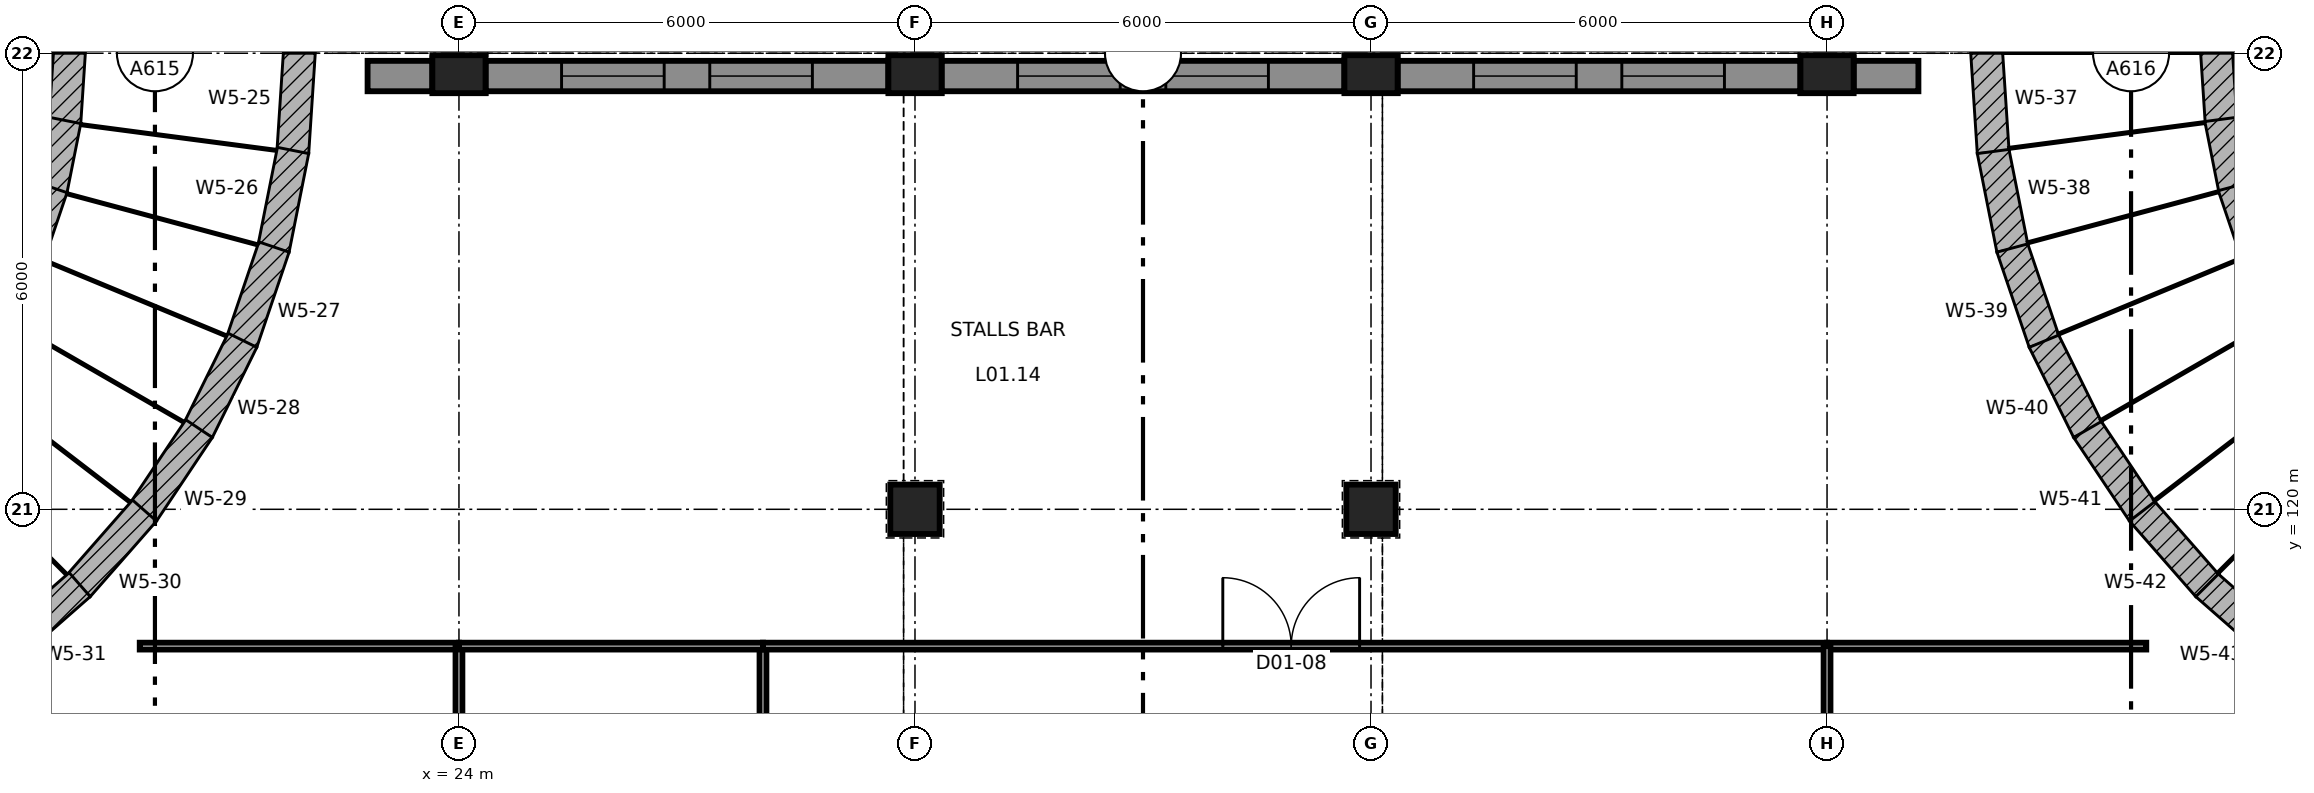
"""IFC4 building model, lengths in metres.
Left out: names, types, materials, properties, quantities, classifications, styles, units other than length and angle.
Written with IfcOpenShell. Run it as: python <this file> out.ifc"""

import sys

from ifc_helpers import new_model, si_unit, direction, frame, frame_2d, origin, origin_2d, place, context, subcontext, project, spatial, polyline, rectangle, outline, extrude, element, fill, save


model = new_model("IFC4")
c1 = context("Model", 3, precision=1e-05, world=origin(), true_north=direction((0.0, 1.0)))
c2 = subcontext(c1, "Body", "Model", "MODEL_VIEW")
j1 = project(units=[si_unit("LENGTHUNIT", "METRE"), si_unit("PLANEANGLEUNIT", "RADIAN")], contexts=[c1])
p1 = place(None, origin())
s1 = spatial("IfcSite", under=j1, at=p1, CompositionType="ELEMENT")
p2 = place(p1, origin())
s2 = spatial("IfcBuilding", under=s1, at=p2, CompositionType="ELEMENT")
p3 = place(p2, frame((0.0, 0.0, 7.0)))
s3 = spatial("IfcBuildingStorey", under=s2, at=p3, CompositionType="ELEMENT", Elevation=7.0)
for number, where, z_axis, x_axis in (
    (1, (30.0, 120.0, 0.0), (0.0, 0.0, 1.0), (1.0, 0.0, 0.0)),
    (2, (36.0, 120.0, 0.0), (0.0, 0.0, 1.0), (1.0, 0.0, 0.0)),
):
    element("IfcColumn", number, at=place(p3, frame(where, z_axis=z_axis, x_axis=x_axis)), inside=s3, PredefinedType="COLUMN", context=c2, shape_type="SweptSolid", body=[
        extrude(rectangle(XDim=0.65, YDim=0.65, at=origin_2d()), origin(), (0.0, 0.0, 1.0), 5.0),
    ])
for number, where, z_axis, x_axis in (
    (3, (24.0, 125.725, 0.0), (0.0, 0.0, 1.0), (1.0, 0.0, 0.0)),
    (4, (30.0, 125.725, 0.0), (0.0, 0.0, 1.0), (1.0, 0.0, 0.0)),
    (5, (36.0, 125.725, 0.0), (0.0, 0.0, 1.0), (1.0, 0.0, 0.0)),
    (6, (42.0, 125.725, 0.0), (0.0, 0.0, 1.0), (1.0, 0.0, 0.0)),
):
    element("IfcColumn", number, at=place(p3, frame(where, z_axis=z_axis, x_axis=x_axis)), inside=s3, PredefinedType="COLUMN", context=c2, shape_type="SweptSolid", body=[
        extrude(rectangle(XDim=0.7, YDim=0.5, at=origin_2d()), origin(), (0.0, 0.0, 1.0), 5.0),
    ])
p4 = place(p3, frame((22.11, 126.0, 0.0), z_axis=(0.836965590728, -0.054899407289, 0.544494862249), x_axis=(-0.065478224383, -0.997853997628, 3.9353391e-05)))
e7 = element("IfcWall", 7, at=p4, inside=s3, PredefinedType="SOLIDWALL", context=c2, shape_type="SweptSolid", body=[
    extrude(outline(polyline([(0.0, 0.0), (1.322, 0.0), (1.125, -5.544), (0.198, -5.544), (0.0, 0.0)])), origin(), (-7.539e-05, 0.544, 0.839), 0.596),
])
p5 = place(p3, frame((22.023, 124.68, 0.0), z_axis=(0.822637628243, -0.163726196101, 0.544482382919), x_axis=(-0.19518555592, -0.980766332218, -1.8656341e-05)))
e8 = element("IfcWall", 8, at=p5, inside=s3, PredefinedType="SOLIDWALL", context=c2, shape_type="SweptSolid", body=[
    extrude(outline(polyline([(0.0, 0.0), (1.322, 0.0), (1.125, -5.544), (0.198, -5.544), (0.0, 0.0)])), origin(), (-9.736e-05, 0.544, 0.839), 0.596),
])
p6 = place(p3, frame((21.765, 123.383, 0.0), z_axis=(0.794324736016, -0.269418488523, 0.544483141883), x_axis=(-0.321223106822, -0.947003545328, 2.7908524e-05)))
e9 = element("IfcWall", 9, at=p6, inside=s3, PredefinedType="SOLIDWALL", context=c2, shape_type="SweptSolid", body=[
    extrude(outline(polyline([(0.0, 0.0), (1.322, -5.551e-17), (1.124, -5.544), (0.197, -5.544), (0.0, 0.0)])), origin(), (0.0, 0.544, 0.839), 0.596),
])
p7 = place(p3, frame((21.34, 122.131, 0.0), z_axis=(0.752251892463, -0.371027167972, 0.544477667964), x_axis=(-0.442340729705, -0.896847076605, -5.472957e-06)))
e10 = element("IfcWall", 10, at=p7, inside=s3, PredefinedType="SOLIDWALL", context=c2, shape_type="SweptSolid", body=[
    extrude(outline(polyline([(0.0, 0.0), (1.322, 0.0), (1.125, -5.544), (0.198, -5.544), (0.0, 0.0)])), origin(), (-5.786e-05, 0.544, 0.839), 0.596),
])
p8 = place(p3, frame((20.755, 120.945, 0.0), z_axis=(0.697421440223, -0.465979494917, 0.544487323116), x_axis=(-0.555539086285, -0.831490422718, -2.3173265e-05)))
e11 = element("IfcWall", 11, at=p8, inside=s3, PredefinedType="SOLIDWALL", context=c2, shape_type="SweptSolid", body=[
    extrude(outline(polyline([(0.0, 0.0), (1.322, 0.0), (1.124, -5.544), (0.198, -5.544), (0.0, 0.0)])), origin(), (3.705e-05, 0.544, 0.839), 0.596),
])
p9 = place(p3, frame((20.021, 119.845, 0.0), z_axis=(0.630572172367, -0.553093552863, 0.544487150645), x_axis=(-0.659421060078, -0.751773812455, 2.0792921e-05)))
e12 = element("IfcWall", 12, at=p9, inside=s3, PredefinedType="SOLIDWALL", context=c2, shape_type="SweptSolid", body=[
    extrude(outline(polyline([(0.0, 0.0), (1.322, -5.551e-17), (1.125, -5.544), (0.198, -5.544), (0.0, 0.0)])), origin(), (-0.0, 0.544, 0.839), 0.596),
])
p10 = place(p3, frame((19.148, 118.851, 0.0), z_axis=(0.553093552863, -0.630572172367, 0.544487150645), x_axis=(-0.751773812455, -0.659421060078, -2.0792921e-05)))
e13 = element("IfcWall", 13, at=p10, inside=s3, PredefinedType="SOLIDWALL", context=c2, shape_type="SweptSolid", body=[
    extrude(outline(polyline([(0.0, 0.0), (1.322, 5.551e-17), (1.124, -5.544), (0.197, -5.544), (0.0, 0.0)])), origin(), (0.0, 0.544, 0.839), 0.596),
])
p11 = place(p3, frame((43.977, 124.68, 0.0), z_axis=(-0.836965590728, -0.054899407289, 0.544494862249), x_axis=(-0.065478224383, 0.997853997628, -3.9353391e-05)))
e14 = element("IfcWall", 14, at=p11, inside=s3, PredefinedType="SOLIDWALL", context=c2, shape_type="SweptSolid", body=[
    extrude(outline(polyline([(0.0, 0.0), (1.322, 0.0), (1.124, -5.544), (0.197, -5.544), (0.0, 0.0)])), origin(), (7.539e-05, 0.544, 0.839), 0.596),
])
p12 = place(p3, frame((44.235, 123.383, 0.0), z_axis=(-0.822637628243, -0.163726196101, 0.544482382919), x_axis=(-0.19518555592, 0.980766332218, 1.8656341e-05)))
e15 = element("IfcWall", 15, at=p12, inside=s3, PredefinedType="SOLIDWALL", context=c2, shape_type="SweptSolid", body=[
    extrude(outline(polyline([(0.0, 0.0), (1.322, 0.0), (1.124, -5.544), (0.198, -5.544), (0.0, 0.0)])), origin(), (9.736e-05, 0.544, 0.839), 0.596),
])
p13 = place(p3, frame((44.66, 122.131, 0.0), z_axis=(-0.794324736016, -0.269418488523, 0.544483141883), x_axis=(-0.321223106822, 0.947003545328, -2.7908524e-05)))
e16 = element("IfcWall", 16, at=p13, inside=s3, PredefinedType="SOLIDWALL", context=c2, shape_type="SweptSolid", body=[
    extrude(outline(polyline([(0.0, 0.0), (1.322, 5.551e-17), (1.125, -5.544), (0.198, -5.544), (0.0, 0.0)])), origin(), (-0.0, 0.544, 0.839), 0.596),
])
p14 = place(p3, frame((45.245, 120.945, 0.0), z_axis=(-0.752251892463, -0.371027167972, 0.544477667964), x_axis=(-0.442340729705, 0.896847076605, 5.472957e-06)))
e17 = element("IfcWall", 17, at=p14, inside=s3, PredefinedType="SOLIDWALL", context=c2, shape_type="SweptSolid", body=[
    extrude(outline(polyline([(0.0, 0.0), (1.322, 0.0), (1.124, -5.544), (0.198, -5.544), (0.0, 0.0)])), origin(), (5.786e-05, 0.544, 0.839), 0.596),
])
p15 = place(p3, frame((45.979, 119.845, 0.0), z_axis=(-0.697421440223, -0.465979494917, 0.544487323116), x_axis=(-0.555539086285, 0.831490422718, 2.3173265e-05)))
e18 = element("IfcWall", 18, at=p15, inside=s3, PredefinedType="SOLIDWALL", context=c2, shape_type="SweptSolid", body=[
    extrude(outline(polyline([(0.0, 0.0), (1.322, 0.0), (1.125, -5.544), (0.198, -5.544), (0.0, 0.0)])), origin(), (-3.705e-05, 0.544, 0.839), 0.596),
])
p16 = place(p3, frame((46.852, 118.851, 0.0), z_axis=(-0.630572172367, -0.553093552863, 0.544487150645), x_axis=(-0.659421060078, 0.751773812455, -2.0792921e-05)))
e19 = element("IfcWall", 19, at=p16, inside=s3, PredefinedType="SOLIDWALL", context=c2, shape_type="SweptSolid", body=[
    extrude(outline(polyline([(0.0, 0.0), (1.322, 5.551e-17), (1.124, -5.544), (0.197, -5.544), (0.0, 0.0)])), origin(), (0.0, 0.544, 0.839), 0.596),
])
p17 = place(p3, frame((47.846, 117.979, 0.0), z_axis=(-0.553093552863, -0.630572172367, 0.544487150645), x_axis=(-0.751773812455, 0.659421060078, 2.0792921e-05)))
e20 = element("IfcWall", 20, at=p17, inside=s3, PredefinedType="SOLIDWALL", context=c2, shape_type="SweptSolid", body=[
    extrude(outline(polyline([(0.0, 0.0), (1.322, -5.551e-17), (1.125, -5.544), (0.198, -5.544), (0.0, 0.0)])), origin(), (-0.0, 0.544, 0.839), 0.596),
])
p18 = place(p3, frame((22.798, 125.7, 0.0), z_axis=(0.0, 0.0, 1.0), x_axis=(1.0, 0.0, 0.0)))
e21 = element("IfcWall", 21, at=p18, inside=s3, PredefinedType="SOLIDWALL", context=c2, shape_type="SweptSolid", body=[
    extrude(rectangle(XDim=0.852, YDim=0.4, at=frame_2d((0.426, 0.0))), origin(), (0.0, 0.0, 1.0), 4.65),
])
p19 = place(p3, frame((24.35, 125.7, 0.0), z_axis=(0.0, 0.0, 1.0), x_axis=(1.0, 0.0, 0.0)))
e22 = element("IfcWall", 22, at=p19, inside=s3, PredefinedType="SOLIDWALL", context=c2, shape_type="SweptSolid", body=[
    extrude(rectangle(XDim=5.3, YDim=0.4, at=frame_2d((2.65, 0.0))), origin(), (0.0, 0.0, 1.0), 4.65),
])
p20 = place(p19, frame((1.0, 0.0, 0.9)))
e23 = element("IfcOpeningElement", 23, at=p20, cuts=e22, PredefinedType="OPENING", context=c2, shape_type="SweptSolid", body=[
    extrude(rectangle(XDim=1.35, YDim=2.95, at=frame_2d((0.675, 1.475))), frame((0.0, 0.21, 0.0), z_axis=(0.0, -1.0, 0.0), x_axis=(1.0, 0.0, 0.0)), (0.0, 0.0, 1.0), 0.42),
])
p21 = place(p19, frame((2.95, 0.0, 0.9)))
e24 = element("IfcOpeningElement", 24, at=p21, cuts=e22, PredefinedType="OPENING", context=c2, shape_type="SweptSolid", body=[
    extrude(rectangle(XDim=1.35, YDim=2.95, at=frame_2d((0.675, 1.475))), frame((0.0, 0.21, 0.0), z_axis=(0.0, -1.0, 0.0), x_axis=(1.0, 0.0, 0.0)), (0.0, 0.0, 1.0), 0.42),
])
p22 = place(p3, frame((30.35, 125.7, 0.0), z_axis=(0.0, 0.0, 1.0), x_axis=(1.0, 0.0, 0.0)))
e25 = element("IfcWall", 25, at=p22, inside=s3, PredefinedType="SOLIDWALL", context=c2, shape_type="SweptSolid", body=[
    extrude(rectangle(XDim=5.3, YDim=0.4, at=frame_2d((2.65, 0.0))), origin(), (0.0, 0.0, 1.0), 4.75),
])
p23 = place(p22, frame((1.0, 0.0, 0.9)))
e26 = element("IfcOpeningElement", 26, at=p23, cuts=e25, PredefinedType="OPENING", context=c2, shape_type="SweptSolid", body=[
    extrude(rectangle(XDim=1.35, YDim=2.95, at=frame_2d((0.675, 1.475))), frame((0.0, 0.21, 0.0), z_axis=(0.0, -1.0, 0.0), x_axis=(1.0, 0.0, 0.0)), (0.0, 0.0, 1.0), 0.42),
])
p24 = place(p22, frame((2.95, 0.0, 0.9)))
e27 = element("IfcOpeningElement", 27, at=p24, cuts=e25, PredefinedType="OPENING", context=c2, shape_type="SweptSolid", body=[
    extrude(rectangle(XDim=1.35, YDim=2.95, at=frame_2d((0.675, 1.475))), frame((0.0, 0.21, 0.0), z_axis=(0.0, -1.0, 0.0), x_axis=(1.0, 0.0, 0.0)), (0.0, 0.0, 1.0), 0.42),
])
p25 = place(p3, frame((36.35, 125.7, 0.0), z_axis=(0.0, 0.0, 1.0), x_axis=(1.0, 0.0, 0.0)))
e28 = element("IfcWall", 28, at=p25, inside=s3, PredefinedType="SOLIDWALL", context=c2, shape_type="SweptSolid", body=[
    extrude(rectangle(XDim=5.3, YDim=0.4, at=frame_2d((2.65, 0.0))), origin(), (0.0, 0.0, 1.0), 4.65),
])
p26 = place(p25, frame((1.0, 0.0, 0.9)))
e29 = element("IfcOpeningElement", 29, at=p26, cuts=e28, PredefinedType="OPENING", context=c2, shape_type="SweptSolid", body=[
    extrude(rectangle(XDim=1.35, YDim=2.95, at=frame_2d((0.675, 1.475))), frame((0.0, 0.21, 0.0), z_axis=(0.0, -1.0, 0.0), x_axis=(1.0, 0.0, 0.0)), (0.0, 0.0, 1.0), 0.42),
])
p27 = place(p25, frame((2.95, 0.0, 0.9)))
e30 = element("IfcOpeningElement", 30, at=p27, cuts=e28, PredefinedType="OPENING", context=c2, shape_type="SweptSolid", body=[
    extrude(rectangle(XDim=1.35, YDim=2.95, at=frame_2d((0.675, 1.475))), frame((0.0, 0.21, 0.0), z_axis=(0.0, -1.0, 0.0), x_axis=(1.0, 0.0, 0.0)), (0.0, 0.0, 1.0), 0.42),
])
p28 = place(p3, frame((42.35, 125.7, 0.0), z_axis=(0.0, 0.0, 1.0), x_axis=(1.0, 0.0, 0.0)))
e31 = element("IfcWall", 31, at=p28, inside=s3, PredefinedType="SOLIDWALL", context=c2, shape_type="SweptSolid", body=[
    extrude(rectangle(XDim=0.852, YDim=0.4, at=frame_2d((0.426, 0.0))), origin(), (0.0, 0.0, 1.0), 4.65),
])
p29 = place(p3, frame((19.8, 118.2, 0.0), z_axis=(0.0, 0.0, 1.0), x_axis=(1.0, 0.0, 0.0)))
e32 = element("IfcWall", 32, at=p29, inside=s3, PredefinedType="PARTITIONING", context=c2, shape_type="SweptSolid", body=[
    extrude(rectangle(XDim=4.2, YDim=0.09, at=frame_2d((2.1, 0.0))), origin(), (0.0, 0.0, 1.0), 4.75),
])
p30 = place(p3, frame((28.0, 114.2, 0.0), z_axis=(0.0, 0.0, 1.0), x_axis=(0.0, 1.0, 0.0)))
e33 = element("IfcWall", 33, at=p30, inside=s3, PredefinedType="PARTITIONING", context=c2, shape_type="SweptSolid", body=[
    extrude(rectangle(XDim=4.0, YDim=0.09, at=frame_2d((2.0, 0.0))), origin(), (0.0, 0.0, 1.0), 4.75),
])
p31 = place(p3, frame((24.0, 114.345, 0.0), z_axis=(0.0, 0.0, 1.0), x_axis=(0.0, 1.0, 0.0)))
e34 = element("IfcWall", 34, at=p31, inside=s3, PredefinedType="PARTITIONING", context=c2, shape_type="SweptSolid", body=[
    extrude(rectangle(XDim=3.855, YDim=0.09, at=frame_2d((1.927, 0.0))), origin(), (0.0, 0.0, 1.0), 4.75),
])
p32 = place(p3, frame((24.0, 118.2, 0.0), z_axis=(0.0, 0.0, 1.0), x_axis=(1.0, 0.0, 0.0)))
e35 = element("IfcWall", 35, at=p32, inside=s3, PredefinedType="PARTITIONING", context=c2, shape_type="SweptSolid", body=[
    extrude(rectangle(XDim=4.0, YDim=0.09, at=frame_2d((2.0, 0.0))), origin(), (0.0, 0.0, 1.0), 4.75),
])
p33 = place(p3, frame((28.0, 118.2, 0.0), z_axis=(0.0, 0.0, 1.0), x_axis=(1.0, 0.0, 0.0)))
e36 = element("IfcWall", 36, at=p33, inside=s3, PredefinedType="PARTITIONING", context=c2, shape_type="SweptSolid", body=[
    extrude(rectangle(XDim=14.0, YDim=0.09, at=frame_2d((7.0, 0.0))), origin(), (0.0, 0.0, 1.0), 4.05),
])
p34 = place(p33, frame((6.05, 0.0, 0.0)))
e37 = element("IfcOpeningElement", 37, at=p34, cuts=e36, PredefinedType="OPENING", context=c2, shape_type="SweptSolid", body=[
    extrude(rectangle(XDim=1.8, YDim=2.1, at=frame_2d((0.9, 1.05))), frame((0.0, 0.055, 0.0), z_axis=(0.0, -1.0, 0.0), x_axis=(1.0, 0.0, 0.0)), (0.0, 0.0, 1.0), 0.11),
])
p35 = place(p3, frame((42.0, 118.2, 0.0), z_axis=(0.0, 0.0, 1.0), x_axis=(1.0, 0.0, 0.0)))
e38 = element("IfcWall", 38, at=p35, inside=s3, PredefinedType="PARTITIONING", context=c2, shape_type="SweptSolid", body=[
    extrude(rectangle(XDim=4.2, YDim=0.09, at=frame_2d((2.1, 0.0))), origin(), (0.0, 0.0, 1.0), 4.75),
])
p36 = place(p3, frame((42.0, 114.345, 0.0), z_axis=(0.0, 0.0, 1.0), x_axis=(0.0, 1.0, 0.0)))
e39 = element("IfcWall", 39, at=p36, inside=s3, PredefinedType="PARTITIONING", context=c2, shape_type="SweptSolid", body=[
    extrude(rectangle(XDim=3.855, YDim=0.09, at=frame_2d((1.927, 0.0))), origin(), (0.0, 0.0, 1.0), 4.75),
])
p37 = place(p20, origin())
e40 = element("IfcWindow", 40, at=p37, inside=s3, PartitioningType="SINGLE_PANEL", PredefinedType="WINDOW", context=c2, shape_type="SweptSolid", body=[
    extrude(rectangle(XDim=1.35, YDim=2.95, at=frame_2d((0.675, 1.475))), frame((0.0, 0.03, 0.0), z_axis=(0.0, -1.0, 0.0), x_axis=(1.0, 0.0, 0.0)), (0.0, 0.0, 1.0), 0.06),
])
fill(e23, e40)
p38 = place(p21, origin())
e41 = element("IfcWindow", 41, at=p38, inside=s3, PartitioningType="SINGLE_PANEL", PredefinedType="WINDOW", context=c2, shape_type="SweptSolid", body=[
    extrude(rectangle(XDim=1.35, YDim=2.95, at=frame_2d((0.675, 1.475))), frame((0.0, 0.03, 0.0), z_axis=(0.0, -1.0, 0.0), x_axis=(1.0, 0.0, 0.0)), (0.0, 0.0, 1.0), 0.06),
])
fill(e24, e41)
p39 = place(p23, origin())
e42 = element("IfcWindow", 42, at=p39, inside=s3, PartitioningType="SINGLE_PANEL", PredefinedType="WINDOW", context=c2, shape_type="SweptSolid", body=[
    extrude(rectangle(XDim=1.35, YDim=2.95, at=frame_2d((0.675, 1.475))), frame((0.0, 0.03, 0.0), z_axis=(0.0, -1.0, 0.0), x_axis=(1.0, 0.0, 0.0)), (0.0, 0.0, 1.0), 0.06),
])
fill(e26, e42)
p40 = place(p24, origin())
e43 = element("IfcWindow", 43, at=p40, inside=s3, PartitioningType="SINGLE_PANEL", PredefinedType="WINDOW", context=c2, shape_type="SweptSolid", body=[
    extrude(rectangle(XDim=1.35, YDim=2.95, at=frame_2d((0.675, 1.475))), frame((0.0, 0.03, 0.0), z_axis=(0.0, -1.0, 0.0), x_axis=(1.0, 0.0, 0.0)), (0.0, 0.0, 1.0), 0.06),
])
fill(e27, e43)
p41 = place(p26, origin())
e44 = element("IfcWindow", 44, at=p41, inside=s3, PartitioningType="SINGLE_PANEL", PredefinedType="WINDOW", context=c2, shape_type="SweptSolid", body=[
    extrude(rectangle(XDim=1.35, YDim=2.95, at=frame_2d((0.675, 1.475))), frame((0.0, 0.03, 0.0), z_axis=(0.0, -1.0, 0.0), x_axis=(1.0, 0.0, 0.0)), (0.0, 0.0, 1.0), 0.06),
])
fill(e29, e44)
p42 = place(p27, origin())
e45 = element("IfcWindow", 45, at=p42, inside=s3, PartitioningType="SINGLE_PANEL", PredefinedType="WINDOW", context=c2, shape_type="SweptSolid", body=[
    extrude(rectangle(XDim=1.35, YDim=2.95, at=frame_2d((0.675, 1.475))), frame((0.0, 0.03, 0.0), z_axis=(0.0, -1.0, 0.0), x_axis=(1.0, 0.0, 0.0)), (0.0, 0.0, 1.0), 0.06),
])
fill(e30, e45)
p43 = place(p34, origin())
e46 = element("IfcDoor", 46, at=p43, inside=s3, OperationType="DOUBLE_DOOR_SINGLE_SWING", PredefinedType="DOOR", context=c2, shape_type="SweptSolid", body=[
    extrude(rectangle(XDim=1.8, YDim=2.1, at=frame_2d((0.9, 1.05))), frame((0.0, 0.025, 0.0), z_axis=(0.0, -1.0, 0.0), x_axis=(1.0, 0.0, 0.0)), (0.0, 0.0, 1.0), 0.05),
])
fill(e37, e46)
save(model, sys.argv[1])
